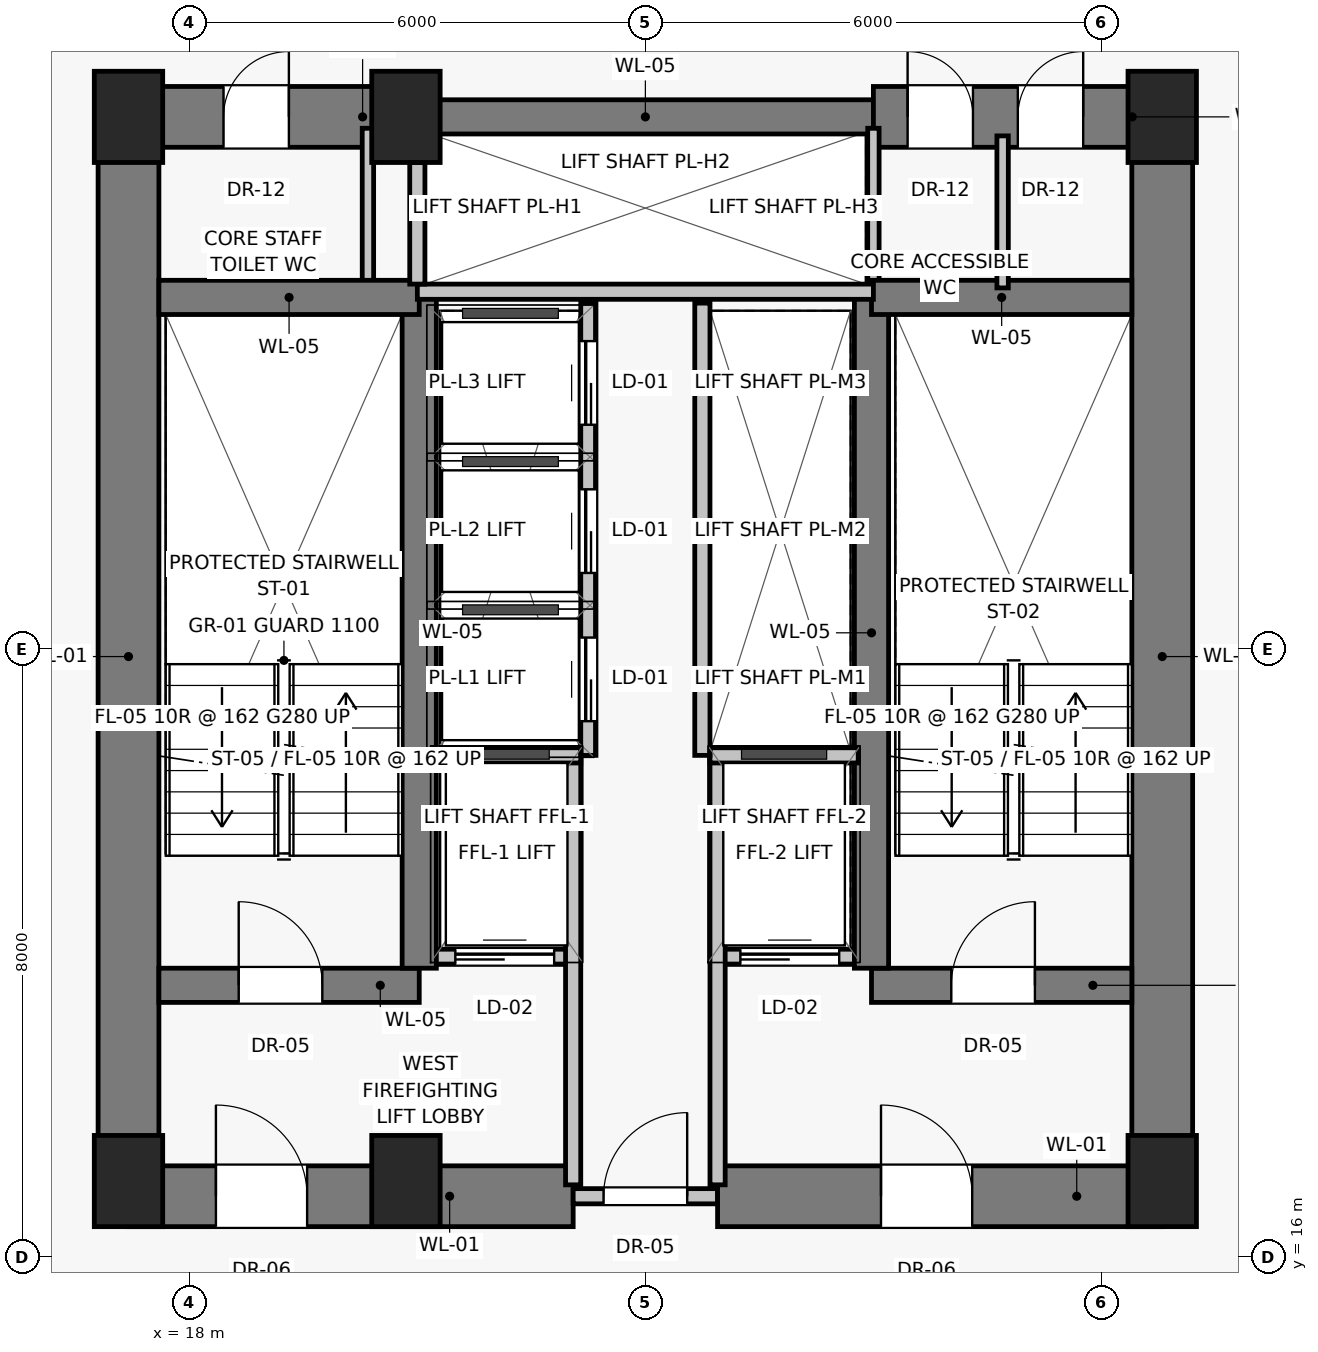
"""IFC4 building model, lengths in metres.
Left out: names, types, materials, properties, quantities, classifications, styles, units other than length and angle.
Written with IfcOpenShell. Run it as: python <this file> out.ifc"""

import sys

from ifc_helpers import new_model, si_unit, direction, frame, frame_2d, origin, origin_2d, place, context, subcontext, project, spatial, rectangle, extrude, source, transform, mapped, element, fill, save


model = new_model("IFC4")
c1 = context("Model", 3, precision=1e-05, world=origin(), true_north=direction((0.0, 1.0)))
c2 = subcontext(c1, "Body", "Model", "MODEL_VIEW")
j1 = project(units=[si_unit("LENGTHUNIT", "METRE"), si_unit("PLANEANGLEUNIT", "RADIAN")], contexts=[c1])
p1 = place(None, origin())
s1 = spatial("IfcSite", under=j1, at=p1, CompositionType="ELEMENT")
p2 = place(p1, origin())
s2 = spatial("IfcBuilding", under=s1, at=p2, CompositionType="ELEMENT")
p3 = place(p2, frame((0.0, 0.0, 40.3)))
s3 = spatial("IfcBuildingStorey", under=s2, at=p3, CompositionType="ELEMENT", Elevation=40.3)
for number, where, z_axis, x_axis in (
    (1, (17.2, 17.0, 0.0), (0.0, 0.0, 1.0), (1.0, 0.0, 0.0)),
    (2, (20.85, 17.0, 0.0), (0.0, 0.0, 1.0), (1.0, 0.0, 0.0)),
    (3, (30.8, 17.0, 0.0), (0.0, 0.0, 1.0), (1.0, 0.0, 0.0)),
    (4, (17.2, 31.0, 0.0), (0.0, 0.0, 1.0), (1.0, 0.0, 0.0)),
    (5, (20.85, 31.0, 0.0), (0.0, 0.0, 1.0), (1.0, 0.0, 0.0)),
    (6, (30.8, 31.0, 0.0), (0.0, 0.0, 1.0), (1.0, 0.0, 0.0)),
):
    element("IfcColumn", number, at=place(p3, frame(where, z_axis=z_axis, x_axis=x_axis)), inside=s3, PredefinedType="PILASTER", context=c2, shape_type="SweptSolid", body=[
        extrude(rectangle(XDim=0.9, YDim=1.2, at=origin_2d()), origin(), (0.0, 0.0, 1.0), 3.25),
    ])
for number, where, z_axis, x_axis in (
    (7, (17.2, 16.8, 0.0), (0.0, 0.0, 1.0), (0.0, 1.0, 0.0)),
    (8, (30.8, 16.8, 0.0), (0.0, 0.0, 1.0), (0.0, 1.0, 0.0)),
):
    element("IfcWall", number, at=place(p3, frame(where, z_axis=z_axis, x_axis=x_axis)), inside=s3, PredefinedType="SHEAR", context=c2, shape_type="SweptSolid", body=[
        extrude(rectangle(XDim=14.2, YDim=0.8, at=frame_2d((7.1, 0.0))), origin(), (0.0, 0.0, 1.0), 3.0),
    ])
p4 = place(p3, frame((17.2, 16.8, 0.0), z_axis=(0.0, 0.0, 1.0), x_axis=(1.0, 0.0, 0.0)))
e9 = element("IfcWall", 9, at=p4, inside=s3, PredefinedType="SHEAR", context=c2, shape_type="SweptSolid", body=[
    extrude(rectangle(XDim=5.85, YDim=0.8, at=frame_2d((2.925, 0.0))), origin(), (0.0, 0.0, 1.0), 3.0),
])
p5 = place(p4, frame((1.15, 0.0, 0.0)))
e10 = element("IfcOpeningElement", 10, at=p5, cuts=e9, PredefinedType="OPENING", context=c2, shape_type="SweptSolid", body=[
    extrude(rectangle(XDim=1.2, YDim=2.03, at=frame_2d((0.6, 1.015))), frame((0.0, 0.41, 0.0), z_axis=(0.0, -1.0, 0.0), x_axis=(1.0, 0.0, 0.0)), (0.0, 0.0, 1.0), 0.82),
])
p6 = place(p3, frame((23.05, 16.8, 0.0), z_axis=(0.0, 0.0, 1.0), x_axis=(1.0, 0.0, 0.0)))
e11 = element("IfcWall", 11, at=p6, inside=s3, PredefinedType="SOLIDWALL", context=c2, shape_type="SweptSolid", body=[
    extrude(rectangle(XDim=1.9, YDim=0.2, at=frame_2d((0.95, 0.0))), origin(), (0.0, 0.0, 1.0), 2.15),
])
p7 = place(p6, frame((0.4, 0.0, 0.0)))
e12 = element("IfcOpeningElement", 12, at=p7, cuts=e11, PredefinedType="OPENING", context=c2, shape_type="SweptSolid", body=[
    extrude(rectangle(XDim=1.1, YDim=2.03, at=frame_2d((0.55, 1.015))), frame((0.0, 0.11, 0.0), z_axis=(0.0, -1.0, 0.0), x_axis=(1.0, 0.0, 0.0)), (0.0, 0.0, 1.0), 0.22),
])
p8 = place(p3, frame((24.95, 16.8, 0.0), z_axis=(0.0, 0.0, 1.0), x_axis=(1.0, 0.0, 0.0)))
e13 = element("IfcWall", 13, at=p8, inside=s3, PredefinedType="SHEAR", context=c2, shape_type="SweptSolid", body=[
    extrude(rectangle(XDim=5.85, YDim=0.8, at=frame_2d((2.925, 0.0))), origin(), (0.0, 0.0, 1.0), 3.0),
])
p9 = place(p8, frame((2.15, 0.0, 0.0)))
e14 = element("IfcOpeningElement", 14, at=p9, cuts=e13, PredefinedType="OPENING", context=c2, shape_type="SweptSolid", body=[
    extrude(rectangle(XDim=1.2, YDim=2.03, at=frame_2d((0.6, 1.015))), frame((0.0, 0.41, 0.0), z_axis=(0.0, -1.0, 0.0), x_axis=(1.0, 0.0, 0.0)), (0.0, 0.0, 1.0), 0.82),
])
p10 = place(p3, frame((17.2, 31.0, 0.0), z_axis=(0.0, 0.0, 1.0), x_axis=(1.0, 0.0, 0.0)))
e15 = element("IfcWall", 15, at=p10, inside=s3, PredefinedType="SHEAR", context=c2, shape_type="SweptSolid", body=[
    extrude(rectangle(XDim=3.8, YDim=0.8, at=frame_2d((1.9, 0.0))), origin(), (0.0, 0.0, 1.0), 3.0),
])
p11 = place(p10, frame((1.25, 0.0, 0.0)))
e16 = element("IfcOpeningElement", 16, at=p11, cuts=e15, PredefinedType="OPENING", context=c2, shape_type="SweptSolid", body=[
    extrude(rectangle(XDim=0.86, YDim=2.01, at=frame_2d((0.43, 1.005))), frame((0.0, 0.41, 0.0), z_axis=(0.0, -1.0, 0.0), x_axis=(1.0, 0.0, 0.0)), (0.0, 0.0, 1.0), 0.82),
])
p12 = place(p3, frame((21.0, 31.0, 0.0), z_axis=(0.0, 0.0, 1.0), x_axis=(1.0, 0.0, 0.0)))
e17 = element("IfcWall", 17, at=p12, inside=s3, PredefinedType="SHEAR", context=c2, shape_type="SweptSolid", body=[
    extrude(rectangle(XDim=6.0, YDim=0.45, at=frame_2d((3.0, 0.0))), origin(), (0.0, 0.0, 1.0), 3.0),
])
p13 = place(p3, frame((27.0, 31.0, 0.0), z_axis=(0.0, 0.0, 1.0), x_axis=(1.0, 0.0, 0.0)))
e18 = element("IfcWall", 18, at=p13, inside=s3, PredefinedType="SHEAR", context=c2, shape_type="SweptSolid", body=[
    extrude(rectangle(XDim=3.8, YDim=0.8, at=frame_2d((1.9, 0.0))), origin(), (0.0, 0.0, 1.0), 3.0),
])
p14 = place(p13, frame((0.45, 0.0, 0.0)))
e19 = element("IfcOpeningElement", 19, at=p14, cuts=e18, PredefinedType="OPENING", context=c2, shape_type="SweptSolid", body=[
    extrude(rectangle(XDim=0.86, YDim=2.01, at=frame_2d((0.43, 1.005))), frame((0.0, 0.41, 0.0), z_axis=(0.0, -1.0, 0.0), x_axis=(1.0, 0.0, 0.0)), (0.0, 0.0, 1.0), 0.82),
])
p15 = place(p13, frame((1.9, 0.0, 0.0)))
e20 = element("IfcOpeningElement", 20, at=p15, cuts=e18, PredefinedType="OPENING", context=c2, shape_type="SweptSolid", body=[
    extrude(rectangle(XDim=0.86, YDim=2.01, at=frame_2d((0.43, 1.005))), frame((0.0, 0.41, 0.0), z_axis=(0.0, -1.0, 0.0), x_axis=(1.0, 0.0, 0.0)), (0.0, 0.0, 1.0), 0.82),
])
for number, where, z_axis, x_axis in (
    (21, (20.35, 28.65, 0.0), (0.0, 0.0, 1.0), (0.0, 1.0, 0.0)),
    (22, (27.0, 28.65, 0.0), (0.0, 0.0, 1.0), (0.0, 1.0, 0.0)),
):
    element("IfcWall", number, at=place(p3, frame(where, z_axis=z_axis, x_axis=x_axis)), inside=s3, PredefinedType="PARTITIONING", context=c2, shape_type="SweptSolid", body=[
        extrude(rectangle(XDim=2.2, YDim=0.15, at=frame_2d((1.1, 0.0))), origin(), (0.0, 0.0, 1.0), 3.0),
    ])
p16 = place(p3, frame((17.6, 19.575, 0.0), z_axis=(0.0, 0.0, 1.0), x_axis=(1.0, 0.0, 0.0)))
e23 = element("IfcWall", 23, at=p16, inside=s3, PredefinedType="SHEAR", context=c2, shape_type="SweptSolid", body=[
    extrude(rectangle(XDim=3.425, YDim=0.45, at=frame_2d((1.712, 0.0))), origin(), (0.0, 0.0, 1.0), 3.0),
])
p17 = place(p16, frame((1.05, 0.0, 0.0)))
e24 = element("IfcOpeningElement", 24, at=p17, cuts=e23, PredefinedType="OPENING", context=c2, shape_type="SweptSolid", body=[
    extrude(rectangle(XDim=1.1, YDim=2.03, at=frame_2d((0.55, 1.015))), frame((0.0, 0.235, 0.0), z_axis=(0.0, -1.0, 0.0), x_axis=(1.0, 0.0, 0.0)), (0.0, 0.0, 1.0), 0.47),
])
p18 = place(p3, frame((21.2, 19.95, 0.0), z_axis=(0.0, 0.0, 1.0), x_axis=(1.0, 0.0, 0.0)))
e25 = element("IfcWall", 25, at=p18, inside=s3, PredefinedType="SOLIDWALL", context=c2, shape_type="SweptSolid", body=[
    extrude(rectangle(XDim=1.85, YDim=0.2, at=frame_2d((0.925, 0.0))), origin(), (0.0, 0.0, 1.0), 3.0),
])
p19 = place(p18, frame((0.3, 0.0, 0.0)))
e26 = element("IfcOpeningElement", 26, at=p19, cuts=e25, PredefinedType="OPENING", context=c2, shape_type="SweptSolid", body=[
    extrude(rectangle(XDim=1.3, YDim=2.25, at=frame_2d((0.65, 1.125))), frame((0.0, 0.11, 0.0), z_axis=(0.0, -1.0, 0.0), x_axis=(1.0, 0.0, 0.0)), (0.0, 0.0, 1.0), 0.22),
])
p20 = place(p3, frame((24.95, 19.95, 0.0), z_axis=(0.0, 0.0, 1.0), x_axis=(1.0, 0.0, 0.0)))
e27 = element("IfcWall", 27, at=p20, inside=s3, PredefinedType="SOLIDWALL", context=c2, shape_type="SweptSolid", body=[
    extrude(rectangle(XDim=1.85, YDim=0.2, at=frame_2d((0.925, 0.0))), origin(), (0.0, 0.0, 1.0), 3.0),
])
p21 = place(p20, frame((0.3, 0.0, 0.0)))
e28 = element("IfcOpeningElement", 28, at=p21, cuts=e27, PredefinedType="OPENING", context=c2, shape_type="SweptSolid", body=[
    extrude(rectangle(XDim=1.3, YDim=2.25, at=frame_2d((0.65, 1.125))), frame((0.0, 0.11, 0.0), z_axis=(0.0, -1.0, 0.0), x_axis=(1.0, 0.0, 0.0)), (0.0, 0.0, 1.0), 0.22),
])
p22 = place(p3, frame((26.975, 19.575, 0.0), z_axis=(0.0, 0.0, 1.0), x_axis=(1.0, 0.0, 0.0)))
e29 = element("IfcWall", 29, at=p22, inside=s3, PredefinedType="SHEAR", context=c2, shape_type="SweptSolid", body=[
    extrude(rectangle(XDim=3.425, YDim=0.45, at=frame_2d((1.712, 0.0))), origin(), (0.0, 0.0, 1.0), 3.0),
])
p23 = place(p22, frame((1.05, 0.0, 0.0)))
e30 = element("IfcOpeningElement", 30, at=p23, cuts=e29, PredefinedType="OPENING", context=c2, shape_type="SweptSolid", body=[
    extrude(rectangle(XDim=1.1, YDim=2.03, at=frame_2d((0.55, 1.015))), frame((0.0, 0.235, 0.0), z_axis=(0.0, -1.0, 0.0), x_axis=(1.0, 0.0, 0.0)), (0.0, 0.0, 1.0), 0.47),
])
for number, where, z_axis, x_axis in (
    (31, (21.025, 19.8, 0.0), (0.0, 0.0, 1.0), (0.0, 1.0, 0.0)),
    (32, (26.975, 19.8, 0.0), (0.0, 0.0, 1.0), (0.0, 1.0, 0.0)),
):
    element("IfcWall", number, at=place(p3, frame(where, z_axis=z_axis, x_axis=x_axis)), inside=s3, PredefinedType="SHEAR", context=c2, shape_type="SweptSolid", body=[
        extrude(rectangle(XDim=8.825, YDim=0.45, at=frame_2d((4.413, 0.0))), origin(), (0.0, 0.0, 1.0), 3.0),
    ])
for number, where, z_axis, x_axis in (
    (33, (17.6, 28.625, 0.0), (0.0, 0.0, 1.0), (1.0, 0.0, 0.0)),
    (34, (26.975, 28.625, 0.0), (0.0, 0.0, 1.0), (1.0, 0.0, 0.0)),
):
    element("IfcWall", number, at=place(p3, frame(where, z_axis=z_axis, x_axis=x_axis)), inside=s3, PredefinedType="SHEAR", context=c2, shape_type="SweptSolid", body=[
        extrude(rectangle(XDim=3.425, YDim=0.45, at=frame_2d((1.712, 0.0))), origin(), (0.0, 0.0, 1.0), 3.0),
    ])
for number, where, z_axis, x_axis in (
    (35, (23.05, 16.95, 0.0), (0.0, 0.0, 1.0), (0.0, 1.0, 0.0)),
    (36, (24.95, 16.95, 0.0), (0.0, 0.0, 1.0), (0.0, 1.0, 0.0)),
):
    element("IfcWall", number, at=place(p3, frame(where, z_axis=z_axis, x_axis=x_axis)), inside=s3, PredefinedType="SOLIDWALL", context=c2, shape_type="SweptSolid", body=[
        extrude(rectangle(XDim=5.6, YDim=0.2, at=frame_2d((2.8, 0.0))), origin(), (0.0, 0.0, 1.0), 3.0),
    ])
for number, where, z_axis, x_axis in (
    (37, (21.2, 22.6, 0.0), (0.0, 0.0, 1.0), (1.0, 0.0, 0.0)),
    (38, (24.85, 22.6, 0.0), (0.0, 0.0, 1.0), (1.0, 0.0, 0.0)),
):
    element("IfcWall", number, at=place(p3, frame(where, z_axis=z_axis, x_axis=x_axis)), inside=s3, PredefinedType="SOLIDWALL", context=c2, shape_type="SweptSolid", body=[
        extrude(rectangle(XDim=1.95, YDim=0.2, at=frame_2d((0.975, 0.0))), origin(), (0.0, 0.0, 1.0), 3.0),
    ])
p24 = place(p3, frame((21.0, 28.7, 0.0), z_axis=(0.0, 0.0, 1.0), x_axis=(1.0, 0.0, 0.0)))
e39 = element("IfcWall", 39, at=p24, inside=s3, PredefinedType="SOLIDWALL", context=c2, shape_type="SweptSolid", body=[
    extrude(rectangle(XDim=6.0, YDim=0.2, at=frame_2d((3.0, 0.0))), origin(), (0.0, 0.0, 1.0), 3.0),
])
p25 = place(p3, frame((21.0, 28.8, 0.0), z_axis=(0.0, 0.0, 1.0), x_axis=(0.0, 1.0, 0.0)))
e40 = element("IfcWall", 40, at=p25, inside=s3, PredefinedType="SOLIDWALL", context=c2, shape_type="SweptSolid", body=[
    extrude(rectangle(XDim=1.6, YDim=0.2, at=frame_2d((0.8, 0.0))), origin(), (0.0, 0.0, 1.0), 3.0),
])
p26 = place(p3, frame((23.25, 22.6, 0.0), z_axis=(0.0, 0.0, 1.0), x_axis=(0.0, 1.0, 0.0)))
e41 = element("IfcWall", 41, at=p26, inside=s3, PredefinedType="SOLIDWALL", context=c2, shape_type="SweptSolid", body=[
    extrude(rectangle(XDim=5.95, YDim=0.2, at=frame_2d((2.975, 0.0))), origin(), (0.0, 0.0, 1.0), 3.0),
])
p27 = place(p26, frame((0.45, 0.0, 0.0)))
e42 = element("IfcOpeningElement", 42, at=p27, cuts=e41, PredefinedType="OPENING", context=c2, shape_type="SweptSolid", body=[
    extrude(rectangle(XDim=1.1, YDim=2.08, at=frame_2d((0.55, 1.04))), frame((0.0, 0.11, 0.0), z_axis=(0.0, -1.0, 0.0), x_axis=(1.0, 0.0, 0.0)), (0.0, 0.0, 1.0), 0.22),
])
p28 = place(p26, frame((2.4, 0.0, 0.0)))
e43 = element("IfcOpeningElement", 43, at=p28, cuts=e41, PredefinedType="OPENING", context=c2, shape_type="SweptSolid", body=[
    extrude(rectangle(XDim=1.1, YDim=2.08, at=frame_2d((0.55, 1.04))), frame((0.0, 0.11, 0.0), z_axis=(0.0, -1.0, 0.0), x_axis=(1.0, 0.0, 0.0)), (0.0, 0.0, 1.0), 0.22),
])
p29 = place(p26, frame((4.35, 0.0, 0.0)))
e44 = element("IfcOpeningElement", 44, at=p29, cuts=e41, PredefinedType="OPENING", context=c2, shape_type="SweptSolid", body=[
    extrude(rectangle(XDim=1.1, YDim=2.08, at=frame_2d((0.55, 1.04))), frame((0.0, 0.11, 0.0), z_axis=(0.0, -1.0, 0.0), x_axis=(1.0, 0.0, 0.0)), (0.0, 0.0, 1.0), 0.22),
])
p30 = place(p3, frame((24.75, 22.6, 0.0), z_axis=(0.0, 0.0, 1.0), x_axis=(0.0, 1.0, 0.0)))
e45 = element("IfcWall", 45, at=p30, inside=s3, PredefinedType="SOLIDWALL", context=c2, shape_type="SweptSolid", body=[
    extrude(rectangle(XDim=5.95, YDim=0.2, at=frame_2d((2.975, 0.0))), origin(), (0.0, 0.0, 1.0), 3.0),
])
p31 = place(p3, frame((28.7, 28.75, 0.0), z_axis=(0.0, 0.0, 1.0), x_axis=(0.0, 1.0, 0.0)))
e46 = element("IfcWall", 46, at=p31, inside=s3, PredefinedType="PARTITIONING", context=c2, shape_type="SweptSolid", body=[
    extrude(rectangle(XDim=2.0, YDim=0.15, at=frame_2d((1.0, 0.0))), origin(), (0.0, 0.0, 1.0), 3.0),
])
m1 = source(origin(), c2, "Body", "SweptSolid", [
    extrude(rectangle(XDim=1.2, YDim=2.03, at=frame_2d((0.6, 1.015))), frame((0.0, 0.025, 0.0), z_axis=(0.0, -1.0, 0.0), x_axis=(1.0, 0.0, 0.0)), (0.0, 0.0, 1.0), 0.05),
])
p32 = place(p5, origin())
e47 = element("IfcDoor", 47, at=p32, inside=s3, OperationType="SINGLE_SWING_LEFT", PredefinedType="DOOR", context=c2, shape_type="MappedRepresentation", body=[
    mapped(m1, transform((0.0, 0.0, 0.0), scale=1.0)),
])
fill(e10, e47)
m2 = source(origin(), c2, "Body", "SweptSolid", [
    extrude(rectangle(XDim=1.1, YDim=2.03, at=frame_2d((0.55, 1.015))), frame((0.0, 0.025, 0.0), z_axis=(0.0, -1.0, 0.0), x_axis=(1.0, 0.0, 0.0)), (0.0, 0.0, 1.0), 0.05),
])
p33 = place(p7, origin())
e48 = element("IfcDoor", 48, at=p33, inside=s3, OperationType="SINGLE_SWING_RIGHT", PredefinedType="DOOR", context=c2, shape_type="MappedRepresentation", body=[
    mapped(m2, transform((0.0, 0.0, 0.0), scale=1.0)),
])
fill(e12, e48)
p34 = place(p9, origin())
e49 = element("IfcDoor", 49, at=p34, inside=s3, OperationType="SINGLE_SWING_LEFT", PredefinedType="DOOR", context=c2, shape_type="MappedRepresentation", body=[
    mapped(m1, transform((0.0, 0.0, 0.0), scale=1.0)),
])
fill(e14, e49)
m3 = source(origin(), c2, "Body", "SweptSolid", [
    extrude(rectangle(XDim=0.86, YDim=2.01, at=frame_2d((0.43, 1.005))), frame((0.0, 0.025, 0.0), z_axis=(0.0, -1.0, 0.0), x_axis=(1.0, 0.0, 0.0)), (0.0, 0.0, 1.0), 0.05),
])
p35 = place(p11, origin())
e50 = element("IfcDoor", 50, at=p35, inside=s3, OperationType="SINGLE_SWING_RIGHT", PredefinedType="DOOR", context=c2, shape_type="MappedRepresentation", body=[
    mapped(m3, transform((0.0, 0.0, 0.0), scale=1.0)),
])
fill(e16, e50)
p36 = place(p14, origin())
e51 = element("IfcDoor", 51, at=p36, inside=s3, OperationType="SINGLE_SWING_LEFT", PredefinedType="DOOR", context=c2, shape_type="MappedRepresentation", body=[
    mapped(m3, transform((0.0, 0.0, 0.0), scale=1.0)),
])
fill(e19, e51)
p37 = place(p15, origin())
e52 = element("IfcDoor", 52, at=p37, inside=s3, OperationType="SINGLE_SWING_RIGHT", PredefinedType="DOOR", context=c2, shape_type="MappedRepresentation", body=[
    mapped(m3, transform((0.0, 0.0, 0.0), scale=1.0)),
])
fill(e20, e52)
p38 = place(p17, origin())
e53 = element("IfcDoor", 53, at=p38, inside=s3, OperationType="SINGLE_SWING_LEFT", PredefinedType="DOOR", context=c2, shape_type="MappedRepresentation", body=[
    mapped(m2, transform((0.0, 0.0, 0.0), scale=1.0)),
])
fill(e24, e53)
m4 = source(origin(), c2, "Body", "SweptSolid", [
    extrude(rectangle(XDim=1.3, YDim=2.25, at=frame_2d((0.65, 1.125))), frame((0.0, 0.025, 0.0), z_axis=(0.0, -1.0, 0.0), x_axis=(1.0, 0.0, 0.0)), (0.0, 0.0, 1.0), 0.05),
])
p39 = place(p19, origin())
e54 = element("IfcDoor", 54, at=p39, inside=s3, OperationType="SLIDING_TO_LEFT", PredefinedType="DOOR", context=c2, shape_type="MappedRepresentation", body=[
    mapped(m4, transform((0.0, 0.0, 0.0), scale=1.0)),
])
fill(e26, e54)
p40 = place(p21, origin())
e55 = element("IfcDoor", 55, at=p40, inside=s3, OperationType="SLIDING_TO_LEFT", PredefinedType="DOOR", context=c2, shape_type="MappedRepresentation", body=[
    mapped(m4, transform((0.0, 0.0, 0.0), scale=1.0)),
])
fill(e28, e55)
p41 = place(p23, origin())
e56 = element("IfcDoor", 56, at=p41, inside=s3, OperationType="SINGLE_SWING_RIGHT", PredefinedType="DOOR", context=c2, shape_type="MappedRepresentation", body=[
    mapped(m2, transform((0.0, 0.0, 0.0), scale=1.0)),
])
fill(e30, e56)
m5 = source(origin(), c2, "Body", "SweptSolid", [
    extrude(rectangle(XDim=1.1, YDim=2.08, at=frame_2d((0.55, 1.04))), frame((0.0, 0.025, 0.0), z_axis=(0.0, -1.0, 0.0), x_axis=(1.0, 0.0, 0.0)), (0.0, 0.0, 1.0), 0.05),
])
p42 = place(p27, origin())
e57 = element("IfcDoor", 57, at=p42, inside=s3, OperationType="SLIDING_TO_LEFT", PredefinedType="DOOR", context=c2, shape_type="MappedRepresentation", body=[
    mapped(m5, transform((0.0, 0.0, 0.0), scale=1.0)),
])
fill(e42, e57)
p43 = place(p28, origin())
e58 = element("IfcDoor", 58, at=p43, inside=s3, OperationType="SLIDING_TO_LEFT", PredefinedType="DOOR", context=c2, shape_type="MappedRepresentation", body=[
    mapped(m5, transform((0.0, 0.0, 0.0), scale=1.0)),
])
fill(e43, e58)
p44 = place(p29, origin())
e59 = element("IfcDoor", 59, at=p44, inside=s3, OperationType="SLIDING_TO_LEFT", PredefinedType="DOOR", context=c2, shape_type="MappedRepresentation", body=[
    mapped(m5, transform((0.0, 0.0, 0.0), scale=1.0)),
])
fill(e44, e59)
save(model, sys.argv[1])
